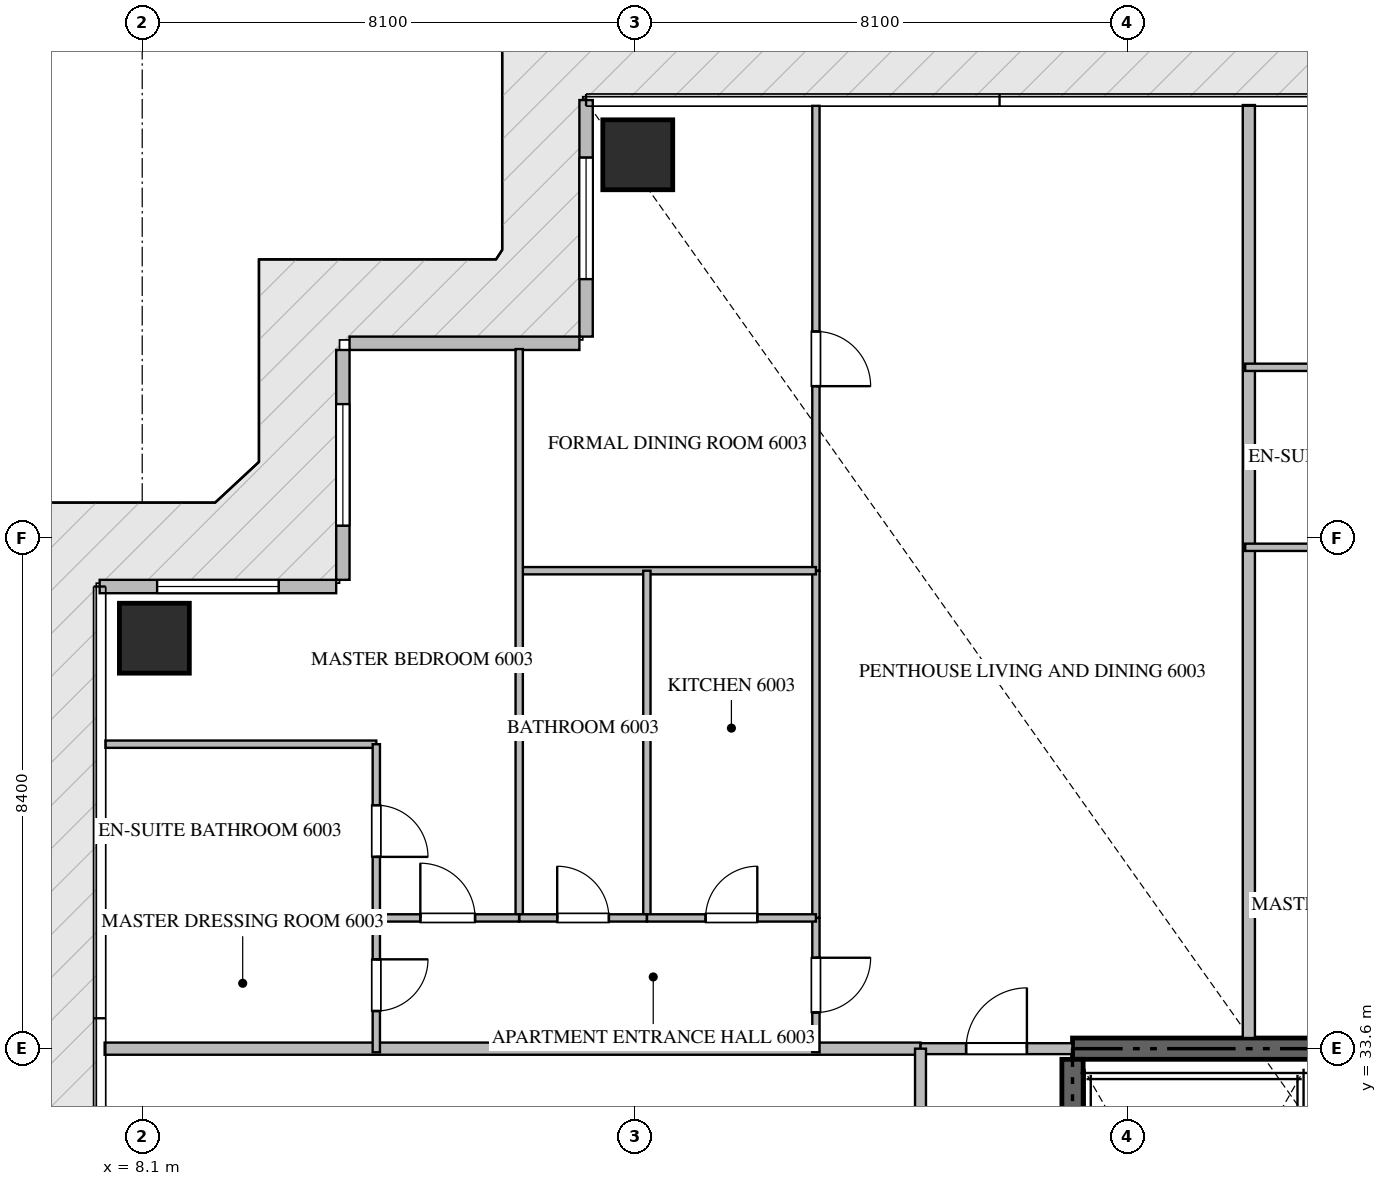
"""IFC4 building model, lengths in metres.
Left out: names, types, materials, properties, quantities, classifications, styles, units other than length and angle.
Written with IfcOpenShell. Run it as: python <this file> out.ifc"""

import sys

from ifc_helpers import new_model, si_unit, direction, frame, frame_2d, origin, origin_2d, place, context, subcontext, project, spatial, rectangle, extrude, source, transform, mapped, element, fill, save


model = new_model("IFC4")
c1 = context("Model", 3, precision=1e-05, world=origin(), true_north=direction((0.0, 1.0)))
c2 = subcontext(c1, "Body", "Model", "MODEL_VIEW")
j1 = project(units=[si_unit("LENGTHUNIT", "METRE"), si_unit("PLANEANGLEUNIT", "RADIAN")], contexts=[c1])
p1 = place(None, origin())
s1 = spatial("IfcSite", under=j1, at=p1, CompositionType="ELEMENT")
p2 = place(p1, origin())
s2 = spatial("IfcBuilding", under=s1, at=p2, CompositionType="ELEMENT")
p3 = place(p2, frame((0.0, 0.0, 241.25)))
s3 = spatial("IfcBuildingStorey", under=s2, at=p3, CompositionType="ELEMENT", Elevation=241.25)
p4 = place(p3, frame((41.4, 33.6, -0.26), z_axis=(0.0, 0.0, 1.0), x_axis=(-1.0, 0.0, 0.0)))
e1 = element("IfcWall", 1, at=p4, inside=s3, PredefinedType="SHEAR", context=c2, shape_type="SweptSolid", body=[
    extrude(rectangle(XDim=18.0, YDim=0.35, at=frame_2d((9.0, 0.0))), origin(), (0.0, 0.0, 1.0), 3.848),
])
p5 = place(p3, frame((23.4, 24.25, -0.26), z_axis=(0.0, 0.0, 1.0), x_axis=(0.0, 1.0, 0.0)))
e2 = element("IfcWall", 2, at=p5, inside=s3, PredefinedType="SHEAR", context=c2, shape_type="SweptSolid", body=[
    extrude(rectangle(XDim=9.175, YDim=0.35, at=frame_2d((4.587, 0.0))), origin(), (0.0, 0.0, 1.0), 3.848),
])
m1 = source(origin(), c2, "Body", "SweptSolid", [
    extrude(rectangle(XDim=1.15, YDim=1.15, at=origin_2d()), origin(), (0.0, 0.0, 1.0), 3.85),
])
for number, where, z_axis, x_axis in (
    (3, (16.25, 48.3, -0.26), (0.0, 0.0, 1.0), (1.0, 0.0, 0.0)),
    (4, (8.3, 40.35, -0.26), (0.0, 0.0, 1.0), (1.0, 0.0, 0.0)),
):
    element("IfcColumn", number, at=place(p3, frame(where, z_axis=z_axis, x_axis=x_axis)), inside=s3, PredefinedType="COLUMN", context=c2, shape_type="MappedRepresentation", body=[
        mapped(m1, transform((0.0, 0.0, 0.0), scale=1.0)),
    ])
p6 = place(p3, frame((15.4, 49.2, 0.0), z_axis=(0.0, 0.0, 1.0), x_axis=(0.0, -1.0, 0.0)))
e5 = element("IfcWall", 5, at=p6, inside=s3, PredefinedType="ELEMENTEDWALL", context=c2, shape_type="SweptSolid", body=[
    extrude(rectangle(XDim=3.89, YDim=0.22, at=frame_2d((1.945, 0.0))), origin(), (0.0, 0.0, 1.0), 3.575),
])
p7 = place(p6, frame((0.945, 0.0, 0.65)))
e6 = element("IfcOpeningElement", 6, at=p7, cuts=e5, PredefinedType="OPENING", context=c2, shape_type="SweptSolid", body=[
    extrude(rectangle(XDim=2.0, YDim=2.2, at=frame_2d((1.0, 1.1))), frame((0.0, 0.12, 0.0), z_axis=(0.0, -1.0, 0.0), x_axis=(1.0, 0.0, 0.0)), (0.0, 0.0, 1.0), 0.24),
])
p8 = place(p3, frame((15.29, 45.2, 0.0), z_axis=(0.0, 0.0, 1.0), x_axis=(-1.0, 0.0, 0.0)))
e7 = element("IfcWall", 7, at=p8, inside=s3, PredefinedType="ELEMENTEDWALL", context=c2, shape_type="SweptSolid", body=[
    extrude(rectangle(XDim=3.78, YDim=0.22, at=frame_2d((1.89, 0.0))), origin(), (0.0, 0.0, 1.0), 3.575),
])
p9 = place(p3, frame((11.4, 45.09, 0.0), z_axis=(0.0, 0.0, 1.0), x_axis=(0.0, -1.0, 0.0)))
e8 = element("IfcWall", 8, at=p9, inside=s3, PredefinedType="ELEMENTEDWALL", context=c2, shape_type="SweptSolid", body=[
    extrude(rectangle(XDim=3.78, YDim=0.22, at=frame_2d((1.89, 0.0))), origin(), (0.0, 0.0, 1.0), 3.575),
])
p10 = place(p9, frame((0.89, 0.0, 0.65)))
e9 = element("IfcOpeningElement", 9, at=p10, cuts=e8, PredefinedType="OPENING", context=c2, shape_type="SweptSolid", body=[
    extrude(rectangle(XDim=2.0, YDim=2.2, at=frame_2d((1.0, 1.1))), frame((0.0, 0.12, 0.0), z_axis=(0.0, -1.0, 0.0), x_axis=(1.0, 0.0, 0.0)), (0.0, 0.0, 1.0), 0.24),
])
p11 = place(p3, frame((11.29, 41.2, 0.0), z_axis=(0.0, 0.0, 1.0), x_axis=(-1.0, 0.0, 0.0)))
e10 = element("IfcWall", 10, at=p11, inside=s3, PredefinedType="ELEMENTEDWALL", context=c2, shape_type="SweptSolid", body=[
    extrude(rectangle(XDim=3.89, YDim=0.22, at=frame_2d((1.945, 0.0))), origin(), (0.0, 0.0, 1.0), 3.575),
])
p12 = place(p11, frame((0.945, 0.0, 0.65)))
e11 = element("IfcOpeningElement", 11, at=p12, cuts=e10, PredefinedType="OPENING", context=c2, shape_type="SweptSolid", body=[
    extrude(rectangle(XDim=2.0, YDim=2.2, at=frame_2d((1.0, 1.1))), frame((0.0, 0.12, 0.0), z_axis=(0.0, -1.0, 0.0), x_axis=(1.0, 0.0, 0.0)), (0.0, 0.0, 1.0), 0.24),
])
p13 = place(p3, frame((26.3, 33.775, 0.0), z_axis=(0.0, 0.0, 1.0), x_axis=(0.0, 1.0, 0.0)))
e12 = element("IfcWall", 12, at=p13, inside=s3, PredefinedType="PARTITIONING", context=c2, shape_type="SweptSolid", body=[
    extrude(rectangle(XDim=15.343, YDim=0.2, at=frame_2d((7.671, 0.0))), origin(), (0.0, 0.0, 1.0), 3.59),
])
p14 = place(p3, frame((7.482, 33.6, 0.0), z_axis=(0.0, 0.0, 1.0), x_axis=(1.0, 0.0, 0.0)))
e13 = element("IfcWall", 13, at=p14, inside=s3, PredefinedType="PARTITIONING", context=c2, shape_type="SweptSolid", body=[
    extrude(rectangle(XDim=13.418, YDim=0.2, at=frame_2d((6.709, 0.0))), origin(), (0.0, 0.0, 1.0), 3.59),
])
p15 = place(p3, frame((20.902, 33.6, 0.0), z_axis=(0.0, 0.0, 1.0), x_axis=(1.0, 0.0, 0.0)))
e14 = element("IfcWall", 14, at=p15, inside=s3, PredefinedType="PARTITIONING", context=c2, shape_type="SweptSolid", body=[
    extrude(rectangle(XDim=2.496, YDim=0.18, at=frame_2d((1.248, 0.0))), origin(), (0.0, 0.0, 1.0), 3.59),
])
p16 = place(p15, frame((0.748, 0.0, 0.0)))
e15 = element("IfcOpeningElement", 15, at=p16, cuts=e14, PredefinedType="OPENING", context=c2, shape_type="SweptSolid", body=[
    extrude(rectangle(XDim=1.0, YDim=2.15, at=frame_2d((0.5, 1.075))), frame((0.0, 0.1, 0.0), z_axis=(0.0, -1.0, 0.0), x_axis=(1.0, 0.0, 0.0)), (0.0, 0.0, 1.0), 0.2),
])
p17 = place(p3, frame((20.9, 16.8, 0.0), z_axis=(0.0, 0.0, 1.0), x_axis=(0.0, 1.0, 0.0)))
e16 = element("IfcWall", 16, at=p17, inside=s3, PredefinedType="PARTITIONING", context=c2, shape_type="SweptSolid", body=[
    extrude(rectangle(XDim=16.8, YDim=0.18, at=frame_2d((8.4, 0.0))), origin(), (0.0, 0.0, 1.0), 3.59),
])
p18 = place(p17, frame((4.993, 0.0, 0.0)))
e17 = element("IfcOpeningElement", 17, at=p18, cuts=e16, PredefinedType="OPENING", context=c2, shape_type="SweptSolid", body=[
    extrude(rectangle(XDim=1.0, YDim=2.15, at=frame_2d((0.5, 1.075))), frame((0.0, 0.1, 0.0), z_axis=(0.0, -1.0, 0.0), x_axis=(1.0, 0.0, 0.0)), (0.0, 0.0, 1.0), 0.2),
])
p19 = place(p17, frame((13.351, 0.0, 0.0)))
e18 = element("IfcOpeningElement", 18, at=p19, cuts=e16, PredefinedType="OPENING", context=c2, shape_type="SweptSolid", body=[
    extrude(rectangle(XDim=1.0, YDim=2.15, at=frame_2d((0.5, 1.075))), frame((0.0, 0.1, 0.0), z_axis=(0.0, -1.0, 0.0), x_axis=(1.0, 0.0, 0.0)), (0.0, 0.0, 1.0), 0.2),
])
p20 = place(p3, frame((19.18, 35.75, 0.0), z_axis=(0.0, 0.0, 1.0), x_axis=(0.0, -1.0, 0.0)))
e19 = element("IfcWall", 19, at=p20, inside=s3, PredefinedType="PARTITIONING", context=c2, shape_type="SweptSolid", body=[
    extrude(rectangle(XDim=2.21, YDim=0.12, at=frame_2d((1.105, 0.0))), origin(), (0.0, 0.0, 1.0), 3.59),
])
p21 = place(p20, frame((0.655, 0.0, 0.0)))
e20 = element("IfcOpeningElement", 20, at=p21, cuts=e19, PredefinedType="OPENING", context=c2, shape_type="SweptSolid", body=[
    extrude(rectangle(XDim=0.9, YDim=2.1, at=frame_2d((0.45, 1.05))), frame((0.0, 0.07, 0.0), z_axis=(0.0, -1.0, 0.0), x_axis=(1.0, 0.0, 0.0)), (0.0, 0.0, 1.0), 0.14),
])
p22 = place(p3, frame((19.18, 49.105, 0.0), z_axis=(0.0, 0.0, 1.0), x_axis=(0.0, -1.0, 0.0)))
e21 = element("IfcWall", 21, at=p22, inside=s3, PredefinedType="PARTITIONING", context=c2, shape_type="SweptSolid", body=[
    extrude(rectangle(XDim=7.645, YDim=0.12, at=frame_2d((3.823, 0.0))), origin(), (0.0, 0.0, 1.0), 3.59),
])
p23 = place(p22, frame((3.71, 0.0, 0.0)))
e22 = element("IfcOpeningElement", 22, at=p23, cuts=e21, PredefinedType="OPENING", context=c2, shape_type="SweptSolid", body=[
    extrude(rectangle(XDim=0.9, YDim=2.1, at=frame_2d((0.45, 1.05))), frame((0.0, 0.07, 0.0), z_axis=(0.0, -1.0, 0.0), x_axis=(1.0, 0.0, 0.0)), (0.0, 0.0, 1.0), 0.14),
])
p24 = place(p3, frame((19.18, 41.458, 0.0), z_axis=(0.0, 0.0, 1.0), x_axis=(0.0, -1.0, 0.0)))
e23 = element("IfcWall", 23, at=p24, inside=s3, PredefinedType="PARTITIONING", context=c2, shape_type="SweptSolid", body=[
    extrude(rectangle(XDim=5.706, YDim=0.12, at=frame_2d((2.853, 0.0))), origin(), (0.0, 0.0, 1.0), 3.59),
])
p25 = place(p3, frame((14.3, 41.46, 0.0), z_axis=(0.0, 0.0, 1.0), x_axis=(1.0, 0.0, 0.0)))
e24 = element("IfcWall", 24, at=p25, inside=s3, PredefinedType="PARTITIONING", context=c2, shape_type="SweptSolid", body=[
    extrude(rectangle(XDim=4.88, YDim=0.12, at=frame_2d((2.44, 0.0))), origin(), (0.0, 0.0, 1.0), 3.59),
])
p26 = place(p3, frame((14.3, 45.105, 0.0), z_axis=(0.0, 0.0, 1.0), x_axis=(0.0, -1.0, 0.0)))
e25 = element("IfcWall", 25, at=p26, inside=s3, PredefinedType="PARTITIONING", context=c2, shape_type="SweptSolid", body=[
    extrude(rectangle(XDim=9.355, YDim=0.12, at=frame_2d((4.677, 0.0))), origin(), (0.0, 0.0, 1.0), 3.59),
])
p27 = place(p3, frame((16.4, 41.46, 0.0), z_axis=(0.0, 0.0, 1.0), x_axis=(0.0, -1.0, 0.0)))
e26 = element("IfcWall", 26, at=p27, inside=s3, PredefinedType="PARTITIONING", context=c2, shape_type="SweptSolid", body=[
    extrude(rectangle(XDim=5.71, YDim=0.12, at=frame_2d((2.855, 0.0))), origin(), (0.0, 0.0, 1.0), 3.122),
])
p28 = place(p3, frame((14.3, 35.75, 0.0), z_axis=(0.0, 0.0, 1.0), x_axis=(1.0, 0.0, 0.0)))
e27 = element("IfcWall", 27, at=p28, inside=s3, PredefinedType="PARTITIONING", context=c2, shape_type="SweptSolid", body=[
    extrude(rectangle(XDim=2.1, YDim=0.12, at=frame_2d((1.05, 0.0))), origin(), (0.0, 0.0, 1.0), 3.59),
])
p29 = place(p28, frame((0.625, 0.0, 0.0)))
e28 = element("IfcOpeningElement", 28, at=p29, cuts=e27, PredefinedType="OPENING", context=c2, shape_type="SweptSolid", body=[
    extrude(rectangle(XDim=0.85, YDim=2.1, at=frame_2d((0.425, 1.05))), frame((0.0, 0.07, 0.0), z_axis=(0.0, -1.0, 0.0), x_axis=(1.0, 0.0, 0.0)), (0.0, 0.0, 1.0), 0.14),
])
p30 = place(p3, frame((16.402, 35.75, 0.0), z_axis=(0.0, 0.0, 1.0), x_axis=(1.0, 0.0, 0.0)))
e29 = element("IfcWall", 29, at=p30, inside=s3, PredefinedType="PARTITIONING", context=c2, shape_type="SweptSolid", body=[
    extrude(rectangle(XDim=2.778, YDim=0.12, at=frame_2d((1.389, 0.0))), origin(), (0.0, 0.0, 1.0), 3.59),
])
p31 = place(p30, frame((0.964, 0.0, 0.0)))
e30 = element("IfcOpeningElement", 30, at=p31, cuts=e29, PredefinedType="OPENING", context=c2, shape_type="SweptSolid", body=[
    extrude(rectangle(XDim=0.85, YDim=2.1, at=frame_2d((0.425, 1.05))), frame((0.0, 0.07, 0.0), z_axis=(0.0, -1.0, 0.0), x_axis=(1.0, 0.0, 0.0)), (0.0, 0.0, 1.0), 0.14),
])
p32 = place(p3, frame((11.95, 35.75, 0.0), z_axis=(0.0, 0.0, 1.0), x_axis=(1.0, 0.0, 0.0)))
e31 = element("IfcWall", 31, at=p32, inside=s3, PredefinedType="PARTITIONING", context=c2, shape_type="SweptSolid", body=[
    extrude(rectangle(XDim=2.348, YDim=0.12, at=frame_2d((1.174, 0.0))), origin(), (0.0, 0.0, 1.0), 3.59),
])
p33 = place(p32, frame((0.724, 0.0, 0.0)))
e32 = element("IfcOpeningElement", 32, at=p33, cuts=e31, PredefinedType="OPENING", context=c2, shape_type="SweptSolid", body=[
    extrude(rectangle(XDim=0.9, YDim=2.1, at=frame_2d((0.45, 1.05))), frame((0.0, 0.07, 0.0), z_axis=(0.0, -1.0, 0.0), x_axis=(1.0, 0.0, 0.0)), (0.0, 0.0, 1.0), 0.14),
])
p34 = place(p3, frame((7.495, 38.607, 0.0), z_axis=(0.0, 0.0, 1.0), x_axis=(1.0, 0.0, 0.0)))
e33 = element("IfcWall", 33, at=p34, inside=s3, PredefinedType="PARTITIONING", context=c2, shape_type="SweptSolid", body=[
    extrude(rectangle(XDim=4.455, YDim=0.12, at=frame_2d((2.228, 0.0))), origin(), (0.0, 0.0, 1.0), 3.59),
])
p35 = place(p3, frame((7.495, 35.75, 0.0), z_axis=(0.0, 0.0, 1.0), x_axis=(1.0, 0.0, 0.0)))
e34 = element("IfcWall", 34, at=p35, inside=s3, PredefinedType="PARTITIONING", context=c2, shape_type="SweptSolid", body=[
    extrude(rectangle(XDim=4.453, YDim=0.12, at=frame_2d((2.227, 0.0))), origin(), (0.0, 0.0, 1.0), 3.59),
])
p36 = place(p3, frame((11.95, 38.607, 0.0), z_axis=(0.0, 0.0, 1.0), x_axis=(0.0, -1.0, 0.0)))
e35 = element("IfcWall", 35, at=p36, inside=s3, PredefinedType="PARTITIONING", context=c2, shape_type="SweptSolid", body=[
    extrude(rectangle(XDim=2.857, YDim=0.12, at=frame_2d((1.428, 0.0))), origin(), (0.0, 0.0, 1.0), 3.59),
])
p37 = place(p36, frame((1.003, 0.0, 0.0)))
e36 = element("IfcOpeningElement", 36, at=p37, cuts=e35, PredefinedType="OPENING", context=c2, shape_type="SweptSolid", body=[
    extrude(rectangle(XDim=0.85, YDim=2.1, at=frame_2d((0.425, 1.05))), frame((0.0, 0.07, 0.0), z_axis=(0.0, -1.0, 0.0), x_axis=(1.0, 0.0, 0.0)), (0.0, 0.0, 1.0), 0.14),
])
p38 = place(p3, frame((11.95, 35.748, 0.0), z_axis=(0.0, 0.0, 1.0), x_axis=(0.0, -1.0, 0.0)))
e37 = element("IfcWall", 37, at=p38, inside=s3, PredefinedType="PARTITIONING", context=c2, shape_type="SweptSolid", body=[
    extrude(rectangle(XDim=2.208, YDim=0.12, at=frame_2d((1.104, 0.0))), origin(), (0.0, 0.0, 1.0), 3.59),
])
p39 = place(p38, frame((0.679, 0.0, 0.0)))
e38 = element("IfcOpeningElement", 38, at=p39, cuts=e37, PredefinedType="OPENING", context=c2, shape_type="SweptSolid", body=[
    extrude(rectangle(XDim=0.85, YDim=2.1, at=frame_2d((0.425, 1.05))), frame((0.0, 0.07, 0.0), z_axis=(0.0, -1.0, 0.0), x_axis=(1.0, 0.0, 0.0)), (0.0, 0.0, 1.0), 0.14),
])
for number, where, z_axis, x_axis in (
    (39, (26.24, 44.805, 0.0), (0.0, 0.0, 1.0), (1.0, 0.0, 0.0)),
    (40, (26.24, 41.845, 0.0), (0.0, 0.0, 1.0), (1.0, 0.0, 0.0)),
):
    element("IfcWall", number, at=place(p3, frame(where, z_axis=z_axis, x_axis=x_axis)), inside=s3, PredefinedType="PARTITIONING", context=c2, shape_type="SweptSolid", body=[
        extrude(rectangle(XDim=4.79, YDim=0.12, at=frame_2d((2.395, 0.0))), origin(), (0.0, 0.0, 1.0), 3.59),
    ])
m2 = source(origin(), c2, "Body", "SweptSolid", [
    extrude(rectangle(XDim=2.0, YDim=2.2, at=frame_2d((1.0, 1.1))), frame((0.0, 0.03, 0.0), z_axis=(0.0, -1.0, 0.0), x_axis=(1.0, 0.0, 0.0)), (0.0, 0.0, 1.0), 0.06),
])
p40 = place(p7, origin())
e41 = element("IfcWindow", 41, at=p40, inside=s3, PartitioningType="SINGLE_PANEL", PredefinedType="WINDOW", context=c2, shape_type="MappedRepresentation", body=[
    mapped(m2, transform((0.0, 0.0, 0.0), scale=1.0)),
])
fill(e6, e41)
p41 = place(p10, origin())
e42 = element("IfcWindow", 42, at=p41, inside=s3, PartitioningType="SINGLE_PANEL", PredefinedType="WINDOW", context=c2, shape_type="MappedRepresentation", body=[
    mapped(m2, transform((0.0, 0.0, 0.0), scale=1.0)),
])
fill(e9, e42)
p42 = place(p12, origin())
e43 = element("IfcWindow", 43, at=p42, inside=s3, PartitioningType="SINGLE_PANEL", PredefinedType="WINDOW", context=c2, shape_type="MappedRepresentation", body=[
    mapped(m2, transform((0.0, 0.0, 0.0), scale=1.0)),
])
fill(e11, e43)
m3 = source(origin(), c2, "Body", "SweptSolid", [
    extrude(rectangle(XDim=1.0, YDim=2.15, at=frame_2d((0.5, 1.075))), frame((0.0, 0.025, 0.0), z_axis=(0.0, -1.0, 0.0), x_axis=(1.0, 0.0, 0.0)), (0.0, 0.0, 1.0), 0.05),
])
p43 = place(p16, origin())
e44 = element("IfcDoor", 44, at=p43, inside=s3, OperationType="SINGLE_SWING_RIGHT", PredefinedType="DOOR", context=c2, shape_type="MappedRepresentation", body=[
    mapped(m3, transform((0.0, 0.0, 0.0), scale=1.0)),
])
fill(e15, e44)
m4 = source(origin(), c2, "Body", "SweptSolid", [
    extrude(rectangle(XDim=0.9, YDim=2.1, at=frame_2d((0.45, 1.05))), frame((0.0, 0.025, 0.0), z_axis=(0.0, -1.0, 0.0), x_axis=(1.0, 0.0, 0.0)), (0.0, 0.0, 1.0), 0.05),
])
p44 = place(p21, origin())
e45 = element("IfcDoor", 45, at=p44, inside=s3, OperationType="SINGLE_SWING_LEFT", PredefinedType="DOOR", context=c2, shape_type="MappedRepresentation", body=[
    mapped(m4, transform((0.0, 0.0, 0.0), scale=1.0)),
])
fill(e20, e45)
p45 = place(p23, origin())
e46 = element("IfcDoor", 46, at=p45, inside=s3, OperationType="SINGLE_SWING_RIGHT", PredefinedType="DOOR", context=c2, shape_type="MappedRepresentation", body=[
    mapped(m4, transform((0.0, 0.0, 0.0), scale=1.0)),
])
fill(e22, e46)
m5 = source(origin(), c2, "Body", "SweptSolid", [
    extrude(rectangle(XDim=0.85, YDim=2.1, at=frame_2d((0.425, 1.05))), frame((0.0, 0.025, 0.0), z_axis=(0.0, -1.0, 0.0), x_axis=(1.0, 0.0, 0.0)), (0.0, 0.0, 1.0), 0.05),
])
p46 = place(p29, origin())
e47 = element("IfcDoor", 47, at=p46, inside=s3, OperationType="SINGLE_SWING_LEFT", PredefinedType="DOOR", context=c2, shape_type="MappedRepresentation", body=[
    mapped(m5, transform((0.0, 0.0, 0.0), scale=1.0)),
])
fill(e28, e47)
p47 = place(p31, origin())
e48 = element("IfcDoor", 48, at=p47, inside=s3, OperationType="SINGLE_SWING_RIGHT", PredefinedType="DOOR", context=c2, shape_type="MappedRepresentation", body=[
    mapped(m5, transform((0.0, 0.0, 0.0), scale=1.0)),
])
fill(e30, e48)
p48 = place(p33, origin())
e49 = element("IfcDoor", 49, at=p48, inside=s3, OperationType="SINGLE_SWING_LEFT", PredefinedType="DOOR", context=c2, shape_type="MappedRepresentation", body=[
    mapped(m4, transform((0.0, 0.0, 0.0), scale=1.0)),
])
fill(e32, e49)
p49 = place(p37, origin())
e50 = element("IfcDoor", 50, at=p49, inside=s3, OperationType="SINGLE_SWING_RIGHT", PredefinedType="DOOR", context=c2, shape_type="MappedRepresentation", body=[
    mapped(m5, transform((0.0, 0.0, 0.0), scale=1.0)),
])
fill(e36, e50)
p50 = place(p39, origin())
e51 = element("IfcDoor", 51, at=p50, inside=s3, OperationType="SINGLE_SWING_LEFT", PredefinedType="DOOR", context=c2, shape_type="MappedRepresentation", body=[
    mapped(m5, transform((0.0, 0.0, 0.0), scale=1.0)),
])
fill(e38, e51)
save(model, sys.argv[1])
